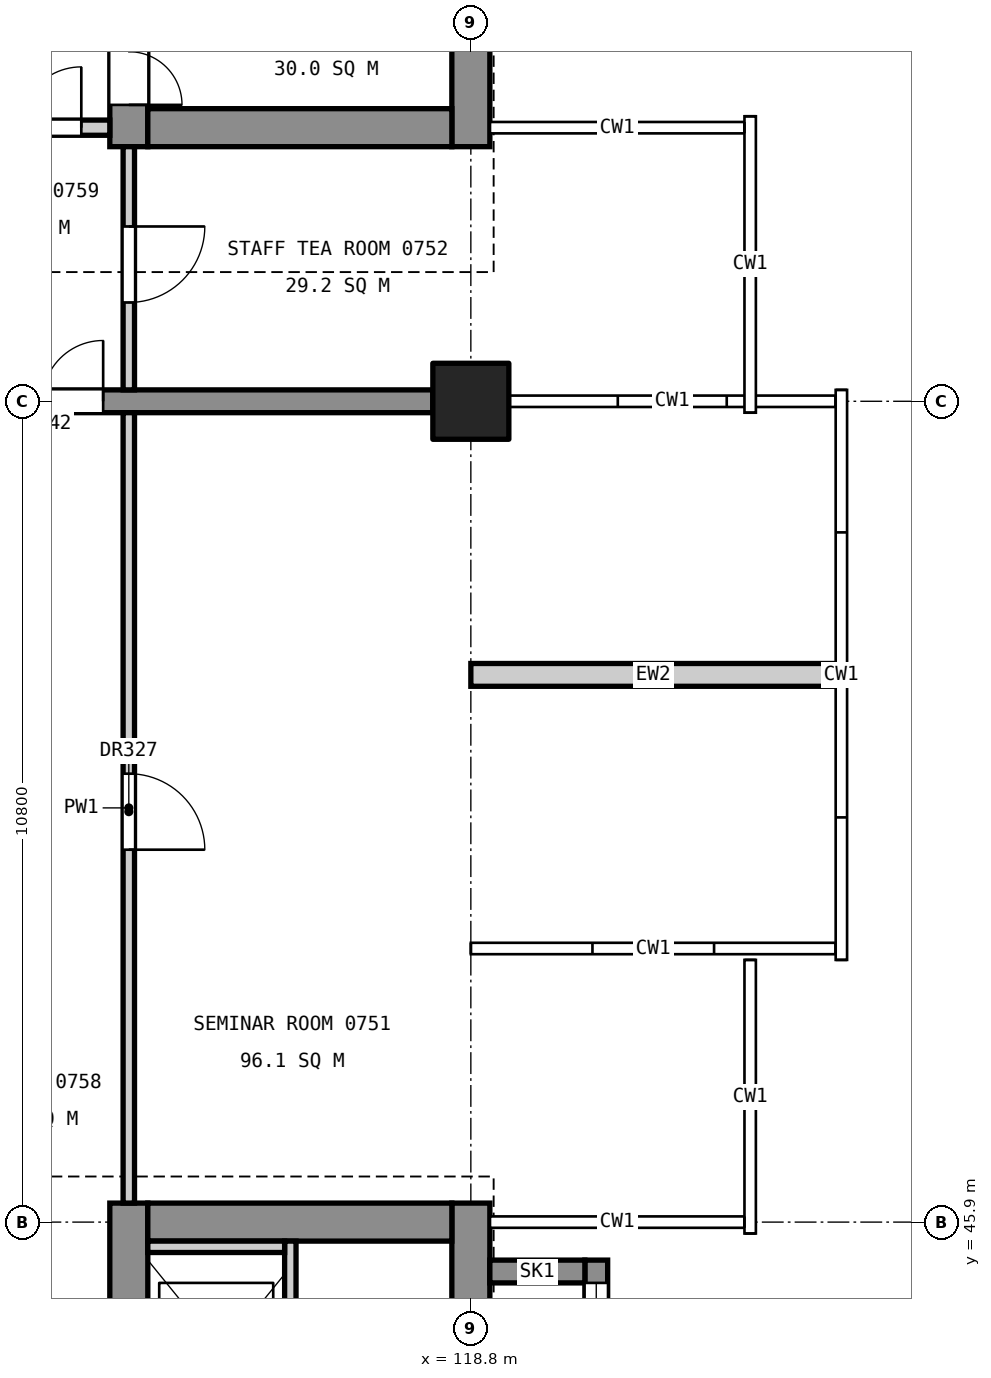
"""IFC4 building model, lengths in metres.
Left out: names, types, materials, properties, quantities, classifications, styles, units other than length and angle.
Written with IfcOpenShell. Run it as: python <this file> out.ifc"""

import sys

from ifc_helpers import new_model, si_unit, direction, frame, frame_2d, origin, origin_2d, place, context, subcontext, project, spatial, rectangle, extrude, element, fill, save


model = new_model("IFC4")
c1 = context("Model", 3, precision=1e-05, world=origin(), true_north=direction((0.0, 1.0)))
c2 = subcontext(c1, "Body", "Model", "MODEL_VIEW")
j1 = project(units=[si_unit("LENGTHUNIT", "METRE"), si_unit("PLANEANGLEUNIT", "RADIAN")], contexts=[c1])
p1 = place(None, origin())
s1 = spatial("IfcSite", under=j1, at=p1, CompositionType="ELEMENT")
p2 = place(p1, origin())
s2 = spatial("IfcBuilding", under=s1, at=p2, CompositionType="ELEMENT")
p3 = place(p2, frame((0.0, 0.0, 36.6)))
s3 = spatial("IfcBuildingStorey", under=s2, at=p3, CompositionType="ELEMENT", Elevation=36.6)
p4 = place(p3, frame((118.8, 56.7, 0.0), z_axis=(0.0, 0.0, 1.0), x_axis=(1.0, 0.0, 0.0)))
e1 = element("IfcColumn", 1, at=p4, inside=s3, PredefinedType="COLUMN", context=c2, shape_type="SweptSolid", body=[
    extrude(rectangle(XDim=1.0, YDim=1.0, at=origin_2d()), origin(), (0.0, 0.0, 1.0), 4.8),
])
p5 = place(p3, frame((118.8, 34.85, 0.0), z_axis=(0.0, 0.0, 1.0), x_axis=(0.0, 1.0, 0.0)))
e2 = element("IfcWall", 2, at=p5, inside=s3, PredefinedType="SHEAR", context=c2, shape_type="SweptSolid", body=[
    extrude(rectangle(XDim=11.3, YDim=0.5, at=frame_2d((5.65, 0.0))), origin(), (0.0, 0.0, 1.0), 4.55),
])
p6 = place(p5, frame((6.16, 0.0, 3.4)))
e3 = element("IfcOpeningElement", 3, at=p6, cuts=e2, PredefinedType="OPENING", context=c2, shape_type="SweptSolid", body=[
    extrude(rectangle(XDim=1.2, YDim=0.9, at=frame_2d((0.6, 0.45))), frame((0.0, 0.26, 0.0), z_axis=(0.0, -1.0, 0.0), x_axis=(1.0, 0.0, 0.0)), (0.0, 0.0, 1.0), 0.52),
])
p7 = place(p3, frame((114.3, 34.85, 0.0), z_axis=(0.0, 0.0, 1.0), x_axis=(0.0, 1.0, 0.0)))
e4 = element("IfcWall", 4, at=p7, inside=s3, PredefinedType="SHEAR", context=c2, shape_type="SweptSolid", body=[
    extrude(rectangle(XDim=11.3, YDim=0.5, at=frame_2d((5.65, 0.0))), origin(), (0.0, 0.0, 1.0), 4.55),
])
p8 = place(p7, frame((0.55, 0.0, 0.0)))
e5 = element("IfcOpeningElement", 5, at=p8, cuts=e4, PredefinedType="OPENING", context=c2, shape_type="SweptSolid", body=[
    extrude(rectangle(XDim=1.4, YDim=2.1, at=frame_2d((0.7, 1.05))), frame((0.0, 0.26, 0.0), z_axis=(0.0, -1.0, 0.0), x_axis=(1.0, 0.0, 0.0)), (0.0, 0.0, 1.0), 0.52),
])
p9 = place(p7, frame((8.8, 0.0, 0.0)))
e6 = element("IfcOpeningElement", 6, at=p9, cuts=e4, PredefinedType="OPENING", context=c2, shape_type="SweptSolid", body=[
    extrude(rectangle(XDim=1.1, YDim=2.1, at=frame_2d((0.55, 1.05))), frame((0.0, 0.26, 0.0), z_axis=(0.0, -1.0, 0.0), x_axis=(1.0, 0.0, 0.0)), (0.0, 0.0, 1.0), 0.52),
])
p10 = place(p3, frame((118.55, 45.9, 0.0), z_axis=(0.0, 0.0, 1.0), x_axis=(-1.0, 0.0, 0.0)))
e7 = element("IfcWall", 7, at=p10, inside=s3, PredefinedType="SHEAR", context=c2, shape_type="SweptSolid", body=[
    extrude(rectangle(XDim=4.0, YDim=0.5, at=frame_2d((2.0, 0.0))), origin(), (0.0, 0.0, 1.0), 4.55),
])
p11 = place(p3, frame((118.8, 60.05, 0.0), z_axis=(0.0, 0.0, 1.0), x_axis=(0.0, 1.0, 0.0)))
e8 = element("IfcWall", 8, at=p11, inside=s3, PredefinedType="SHEAR", context=c2, shape_type="SweptSolid", body=[
    extrude(rectangle(XDim=14.9, YDim=0.5, at=frame_2d((7.45, 0.0))), origin(), (0.0, 0.0, 1.0), 4.55),
])
p12 = place(p11, frame((6.16, 0.0, 3.4)))
e9 = element("IfcOpeningElement", 9, at=p12, cuts=e8, PredefinedType="OPENING", context=c2, shape_type="SweptSolid", body=[
    extrude(rectangle(XDim=1.2, YDim=0.9, at=frame_2d((0.6, 0.45))), frame((0.0, 0.26, 0.0), z_axis=(0.0, -1.0, 0.0), x_axis=(1.0, 0.0, 0.0)), (0.0, 0.0, 1.0), 0.52),
])
p13 = place(p3, frame((114.3, 60.05, 0.0), z_axis=(0.0, 0.0, 1.0), x_axis=(0.0, 1.0, 0.0)))
e10 = element("IfcWall", 10, at=p13, inside=s3, PredefinedType="SHEAR", context=c2, shape_type="SweptSolid", body=[
    extrude(rectangle(XDim=14.9, YDim=0.5, at=frame_2d((7.45, 0.0))), origin(), (0.0, 0.0, 1.0), 4.55),
])
p14 = place(p13, frame((0.55, 0.0, 0.0)))
e11 = element("IfcOpeningElement", 11, at=p14, cuts=e10, PredefinedType="OPENING", context=c2, shape_type="SweptSolid", body=[
    extrude(rectangle(XDim=1.4, YDim=2.1, at=frame_2d((0.7, 1.05))), frame((0.0, 0.26, 0.0), z_axis=(0.0, -1.0, 0.0), x_axis=(1.0, 0.0, 0.0)), (0.0, 0.0, 1.0), 0.52),
])
p15 = place(p13, frame((8.85, 0.0, 0.0)))
e12 = element("IfcOpeningElement", 12, at=p15, cuts=e10, PredefinedType="OPENING", context=c2, shape_type="SweptSolid", body=[
    extrude(rectangle(XDim=1.1, YDim=2.1, at=frame_2d((0.55, 1.05))), frame((0.0, 0.26, 0.0), z_axis=(0.0, -1.0, 0.0), x_axis=(1.0, 0.0, 0.0)), (0.0, 0.0, 1.0), 0.52),
])
p16 = place(p13, frame((11.4, 0.0, 0.0)))
e13 = element("IfcOpeningElement", 13, at=p16, cuts=e10, PredefinedType="OPENING", context=c2, shape_type="SweptSolid", body=[
    extrude(rectangle(XDim=1.1, YDim=2.1, at=frame_2d((0.55, 1.05))), frame((0.0, 0.26, 0.0), z_axis=(0.0, -1.0, 0.0), x_axis=(1.0, 0.0, 0.0)), (0.0, 0.0, 1.0), 0.52),
])
p17 = place(p3, frame((118.55, 60.3, 0.0), z_axis=(0.0, 0.0, 1.0), x_axis=(-1.0, 0.0, 0.0)))
e14 = element("IfcWall", 14, at=p17, inside=s3, PredefinedType="SHEAR", context=c2, shape_type="SweptSolid", body=[
    extrude(rectangle(XDim=4.0, YDim=0.5, at=frame_2d((2.0, 0.0))), origin(), (0.0, 0.0, 1.0), 4.55),
])
p18 = place(p3, frame((120.45, 43.0, 0.0), z_axis=(0.0, 0.0, 1.0), x_axis=(0.0, 1.0, 0.0)))
e15 = element("IfcWall", 15, at=p18, inside=s3, PredefinedType="SHEAR", context=c2, shape_type="SweptSolid", body=[
    extrude(rectangle(XDim=2.4, YDim=0.3, at=frame_2d((1.2, 0.0))), origin(), (0.0, 0.0, 1.0), 4.8),
])
p19 = place(p18, frame((0.3, 0.0, 3.0)))
e16 = element("IfcOpeningElement", 16, at=p19, cuts=e15, PredefinedType="OPENING", context=c2, shape_type="SweptSolid", body=[
    extrude(rectangle(XDim=1.8, YDim=1.2, at=frame_2d((0.9, 0.6))), frame((0.0, 0.16, 0.0), z_axis=(0.0, -1.0, 0.0), x_axis=(1.0, 0.0, 0.0)), (0.0, 0.0, 1.0), 0.32),
])
p20 = place(p3, frame((119.05, 45.25, 0.0), z_axis=(0.0, 0.0, 1.0), x_axis=(1.0, 0.0, 0.0)))
e17 = element("IfcWall", 17, at=p20, inside=s3, PredefinedType="SHEAR", context=c2, shape_type="SweptSolid", body=[
    extrude(rectangle(XDim=1.25, YDim=0.3, at=frame_2d((0.625, 0.0))), origin(), (0.0, 0.0, 1.0), 4.8),
])
p21 = place(p3, frame((118.3, 56.7, 0.0), z_axis=(0.0, 0.0, 1.0), x_axis=(-1.0, 0.0, 0.0)))
e18 = element("IfcWall", 18, at=p21, inside=s3, PredefinedType="SHEAR", context=c2, shape_type="SweptSolid", body=[
    extrude(rectangle(XDim=6.2, YDim=0.3, at=frame_2d((3.1, 0.0))), origin(), (0.0, 0.0, 1.0), 4.55),
])
p22 = place(p21, frame((4.337, 0.0, 0.0)))
e19 = element("IfcOpeningElement", 19, at=p22, cuts=e18, PredefinedType="OPENING", context=c2, shape_type="SweptSolid", body=[
    extrude(rectangle(XDim=1.6, YDim=2.1, at=frame_2d((0.8, 1.05))), frame((0.0, 0.16, 0.0), z_axis=(0.0, -1.0, 0.0), x_axis=(1.0, 0.0, 0.0)), (0.0, 0.0, 1.0), 0.32),
])
p23 = place(p3, frame((116.425, 43.0, 0.0), z_axis=(0.0, 0.0, 1.0), x_axis=(0.0, 1.0, 0.0)))
e20 = element("IfcWall", 20, at=p23, inside=s3, PredefinedType="SOLIDWALL", context=c2, shape_type="SweptSolid", body=[
    extrude(rectangle(XDim=2.65, YDim=0.15, at=frame_2d((1.325, 0.0))), origin(), (0.0, 0.0, 1.0), 4.8),
])
p24 = place(p3, frame((116.35, 45.575, 0.0), z_axis=(0.0, 0.0, 1.0), x_axis=(-1.0, 0.0, 0.0)))
e21 = element("IfcWall", 21, at=p24, inside=s3, PredefinedType="SOLIDWALL", context=c2, shape_type="SweptSolid", body=[
    extrude(rectangle(XDim=1.8, YDim=0.15, at=frame_2d((0.9, 0.0))), origin(), (0.0, 0.0, 1.0), 4.8),
])
p25 = place(p3, frame((123.6, 53.1, 0.0), z_axis=(0.0, 0.0, 1.0), x_axis=(-1.0, 0.0, 0.0)))
e22 = element("IfcWall", 22, at=p25, inside=s3, PredefinedType="STANDARD", context=c2, shape_type="SweptSolid", body=[
    extrude(rectangle(XDim=4.8, YDim=0.3, at=frame_2d((2.4, 0.0))), origin(), (0.0, 0.0, 1.0), 3.65),
])
p26 = place(p3, frame((114.3, 46.15, 0.0), z_axis=(0.0, 0.0, 1.0), x_axis=(0.0, 1.0, 0.0)))
e23 = element("IfcWall", 23, at=p26, inside=s3, PredefinedType="PARTITIONING", context=c2, shape_type="SweptSolid", body=[
    extrude(rectangle(XDim=10.4, YDim=0.15, at=frame_2d((5.2, 0.0))), origin(), (0.0, 0.0, 1.0), 3.55),
])
p27 = place(p26, frame((4.65, 0.0, 0.0)))
e24 = element("IfcOpeningElement", 24, at=p27, cuts=e23, PredefinedType="OPENING", context=c2, shape_type="SweptSolid", body=[
    extrude(rectangle(XDim=1.0, YDim=2.1, at=frame_2d((0.5, 1.05))), frame((0.0, 0.085, 0.0), z_axis=(0.0, -1.0, 0.0), x_axis=(1.0, 0.0, 0.0)), (0.0, 0.0, 1.0), 0.17),
])
p28 = place(p3, frame((114.3, 56.85, 0.0), z_axis=(0.0, 0.0, 1.0), x_axis=(0.0, 1.0, 0.0)))
e25 = element("IfcWall", 25, at=p28, inside=s3, PredefinedType="PARTITIONING", context=c2, shape_type="SweptSolid", body=[
    extrude(rectangle(XDim=3.2, YDim=0.15, at=frame_2d((1.6, 0.0))), origin(), (0.0, 0.0, 1.0), 3.55),
])
p29 = place(p28, frame((1.15, 0.0, 0.0)))
e26 = element("IfcOpeningElement", 26, at=p29, cuts=e25, PredefinedType="OPENING", context=c2, shape_type="SweptSolid", body=[
    extrude(rectangle(XDim=1.0, YDim=2.1, at=frame_2d((0.5, 1.05))), frame((0.0, 0.085, 0.0), z_axis=(0.0, -1.0, 0.0), x_axis=(1.0, 0.0, 0.0)), (0.0, 0.0, 1.0), 0.17),
])
p30 = place(p3, frame((114.05, 60.3, 0.0), z_axis=(0.0, 0.0, 1.0), x_axis=(-1.0, 0.0, 0.0)))
e27 = element("IfcWall", 27, at=p30, inside=s3, PredefinedType="PARTITIONING", context=c2, shape_type="SweptSolid", body=[
    extrude(rectangle(XDim=2.35, YDim=0.2, at=frame_2d((1.175, 0.0))), origin(), (0.0, 0.0, 1.0), 3.85),
])
p31 = place(p30, frame((0.375, 0.0, 0.0)))
e28 = element("IfcOpeningElement", 28, at=p31, cuts=e27, PredefinedType="OPENING", context=c2, shape_type="SweptSolid", body=[
    extrude(rectangle(XDim=1.6, YDim=2.1, at=frame_2d((0.8, 1.05))), frame((0.0, 0.11, 0.0), z_axis=(0.0, -1.0, 0.0), x_axis=(1.0, 0.0, 0.0)), (0.0, 0.0, 1.0), 0.22),
])
p32 = place(p14, frame((1.4, 0.0, 0.0), z_axis=(0.0, 0.0, 1.0), x_axis=(-1.0, 0.0, 0.0)))
e29 = element("IfcDoor", 29, at=p32, inside=s3, OperationType="DOUBLE_DOOR_SINGLE_SWING", PredefinedType="DOOR", context=c2, shape_type="SweptSolid", body=[
    extrude(rectangle(XDim=1.4, YDim=2.1, at=frame_2d((0.7, 1.05))), frame((0.0, 0.025, 0.0), z_axis=(0.0, -1.0, 0.0), x_axis=(1.0, 0.0, 0.0)), (0.0, 0.0, 1.0), 0.05),
])
fill(e11, e29)
p33 = place(p19, origin())
e30 = element("IfcWindow", 30, at=p33, inside=s3, PartitioningType="SINGLE_PANEL", PredefinedType="WINDOW", context=c2, shape_type="SweptSolid", body=[
    extrude(rectangle(XDim=1.8, YDim=1.2, at=frame_2d((0.9, 0.6))), frame((0.0, 0.03, 0.0), z_axis=(0.0, -1.0, 0.0), x_axis=(1.0, 0.0, 0.0)), (0.0, 0.0, 1.0), 0.06),
])
fill(e16, e30)
p34 = place(p27, frame((1.0, 0.0, 0.0), z_axis=(0.0, 0.0, 1.0), x_axis=(-1.0, 0.0, 0.0)))
e31 = element("IfcDoor", 31, at=p34, inside=s3, OperationType="SINGLE_SWING_RIGHT", PredefinedType="DOOR", context=c2, shape_type="SweptSolid", body=[
    extrude(rectangle(XDim=1.0, YDim=2.1, at=frame_2d((0.5, 1.05))), frame((0.0, 0.025, 0.0), z_axis=(0.0, -1.0, 0.0), x_axis=(1.0, 0.0, 0.0)), (0.0, 0.0, 1.0), 0.05),
])
fill(e24, e31)
p35 = place(p29, frame((1.0, 0.0, 0.0), z_axis=(0.0, 0.0, 1.0), x_axis=(-1.0, 0.0, 0.0)))
e32 = element("IfcDoor", 32, at=p35, inside=s3, OperationType="SINGLE_SWING_LEFT", PredefinedType="DOOR", context=c2, shape_type="SweptSolid", body=[
    extrude(rectangle(XDim=1.0, YDim=2.1, at=frame_2d((0.5, 1.05))), frame((0.0, 0.025, 0.0), z_axis=(0.0, -1.0, 0.0), x_axis=(1.0, 0.0, 0.0)), (0.0, 0.0, 1.0), 0.05),
])
fill(e26, e32)
p36 = place(p31, frame((1.6, 0.0, 0.0), z_axis=(0.0, 0.0, 1.0), x_axis=(-1.0, 0.0, 0.0)))
e33 = element("IfcDoor", 33, at=p36, inside=s3, OperationType="DOUBLE_DOOR_SINGLE_SWING", PredefinedType="DOOR", context=c2, shape_type="SweptSolid", body=[
    extrude(rectangle(XDim=1.6, YDim=2.1, at=frame_2d((0.8, 1.05))), frame((0.0, 0.025, 0.0), z_axis=(0.0, -1.0, 0.0), x_axis=(1.0, 0.0, 0.0)), (0.0, 0.0, 1.0), 0.05),
])
fill(e28, e33)
p37 = place(p22, frame((1.6, 0.0, 0.0), z_axis=(0.0, 0.0, 1.0), x_axis=(-1.0, 0.0, 0.0)))
e34 = element("IfcDoor", 34, at=p37, inside=s3, OperationType="DOUBLE_DOOR_SINGLE_SWING", PredefinedType="DOOR", context=c2, shape_type="SweptSolid", body=[
    extrude(rectangle(XDim=1.6, YDim=2.1, at=frame_2d((0.8, 1.05))), frame((0.0, 0.025, 0.0), z_axis=(0.0, -1.0, 0.0), x_axis=(1.0, 0.0, 0.0)), (0.0, 0.0, 1.0), 0.05),
])
fill(e19, e34)
save(model, sys.argv[1])
